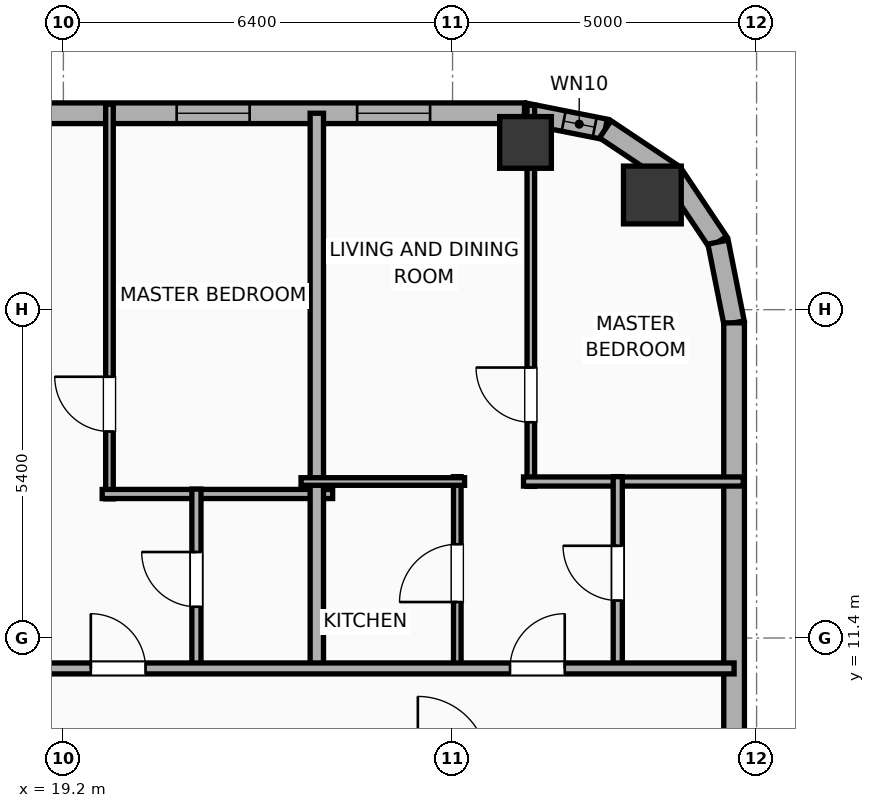
"""IFC4 building model, lengths in metres.
Left out: names, types, materials, properties, quantities, classifications, styles, units other than length and angle.
Written with IfcOpenShell. Run it as: python <this file> out.ifc"""

import sys

from ifc_helpers import new_model, si_unit, direction, frame, frame_2d, origin, origin_2d, place, context, subcontext, project, spatial, rectangle, hollow_rectangle, hollow_circle, extrude, element, fill, save


model = new_model("IFC4")
c1 = context("Model", 3, precision=1e-05, world=origin(), true_north=direction((0.0, 1.0)))
c2 = subcontext(c1, "Body", "Model", "MODEL_VIEW")
j1 = project(units=[si_unit("LENGTHUNIT", "METRE"), si_unit("PLANEANGLEUNIT", "RADIAN")], contexts=[c1])
p1 = place(None, origin())
s1 = spatial("IfcSite", under=j1, at=p1, CompositionType="ELEMENT")
p2 = place(p1, origin())
s2 = spatial("IfcBuilding", under=s1, at=p2, CompositionType="ELEMENT")
p3 = place(p2, frame((0.0, 0.0, 243.1)))
s3 = spatial("IfcBuildingStorey", under=s2, at=p3, CompositionType="ELEMENT", Elevation=243.1)
p4 = place(p3, frame((28.886, 18.686, 0.0), z_axis=(0.0, 0.0, 1.0), x_axis=(1.0, 0.0, 0.0)))
e1 = element("IfcColumn", 1, at=p4, inside=s3, PredefinedType="COLUMN", context=c2, shape_type="SweptSolid", body=[
    extrude(hollow_circle(Radius=0.475, WallThickness=0.032, at=origin_2d()), origin(), (0.0, 0.0, 1.0), 3.9),
])
p5 = place(p3, frame((26.8, 19.55, 0.0), z_axis=(0.0, 0.0, 1.0), x_axis=(1.0, 0.0, 0.0)))
e2 = element("IfcColumn", 2, at=p5, inside=s3, PredefinedType="COLUMN", context=c2, shape_type="SweptSolid", body=[
    extrude(hollow_rectangle(XDim=0.85, YDim=0.85, WallThickness=0.028, at=origin_2d()), origin(), (0.0, 0.0, 1.0), 3.9),
])
p6 = place(p3, frame((-22.783, 20.03, 0.0), z_axis=(0.0, 0.0, 1.0), x_axis=(1.0, 0.0, 0.0)))
e3 = element("IfcWall", 3, at=p6, inside=s3, PredefinedType="ELEMENTEDWALL", context=c2, shape_type="SweptSolid", body=[
    extrude(rectangle(XDim=49.566, YDim=0.34, at=frame_2d((24.783, 0.0))), origin(), (0.0, 0.0, 1.0), 3.65),
])
p7 = place(p6, frame((6.211, 0.0, 0.75)))
e4 = element("IfcOpeningElement", 4, at=p7, cuts=e3, PredefinedType="OPENING", context=c2, shape_type="SweptSolid", body=[
    extrude(rectangle(XDim=2.4, YDim=2.1, at=frame_2d((1.2, 1.05))), frame((0.0, 0.18, 0.0), z_axis=(0.0, -1.0, 0.0), x_axis=(1.0, 0.0, 0.0)), (0.0, 0.0, 1.0), 0.36),
])
p8 = place(p6, frame((25.233, 0.0, 0.75)))
e5 = element("IfcOpeningElement", 5, at=p8, cuts=e3, PredefinedType="OPENING", context=c2, shape_type="SweptSolid", body=[
    extrude(rectangle(XDim=2.4, YDim=2.1, at=frame_2d((1.2, 1.05))), frame((0.0, 0.18, 0.0), z_axis=(0.0, -1.0, 0.0), x_axis=(1.0, 0.0, 0.0)), (0.0, 0.0, 1.0), 0.36),
])
p9 = place(p6, frame((3.511, 0.0, 0.75)))
e6 = element("IfcOpeningElement", 6, at=p9, cuts=e3, PredefinedType="OPENING", context=c2, shape_type="SweptSolid", body=[
    extrude(rectangle(XDim=1.2, YDim=2.05, at=frame_2d((0.6, 1.025))), frame((0.0, 0.18, 0.0), z_axis=(0.0, -1.0, 0.0), x_axis=(1.0, 0.0, 0.0)), (0.0, 0.0, 1.0), 0.36),
])
p10 = place(p6, frame((10.728, 0.0, 0.75)))
e7 = element("IfcOpeningElement", 7, at=p10, cuts=e3, PredefinedType="OPENING", context=c2, shape_type="SweptSolid", body=[
    extrude(rectangle(XDim=1.2, YDim=2.05, at=frame_2d((0.6, 1.025))), frame((0.0, 0.18, 0.0), z_axis=(0.0, -1.0, 0.0), x_axis=(1.0, 0.0, 0.0)), (0.0, 0.0, 1.0), 0.36),
])
p11 = place(p6, frame((14.478, 0.0, 0.75)))
e8 = element("IfcOpeningElement", 8, at=p11, cuts=e3, PredefinedType="OPENING", context=c2, shape_type="SweptSolid", body=[
    extrude(rectangle(XDim=1.2, YDim=2.05, at=frame_2d((0.6, 1.025))), frame((0.0, 0.18, 0.0), z_axis=(0.0, -1.0, 0.0), x_axis=(1.0, 0.0, 0.0)), (0.0, 0.0, 1.0), 0.36),
])
p12 = place(p6, frame((17.988, 0.0, 0.75)))
e9 = element("IfcOpeningElement", 9, at=p12, cuts=e3, PredefinedType="OPENING", context=c2, shape_type="SweptSolid", body=[
    extrude(rectangle(XDim=1.2, YDim=2.05, at=frame_2d((0.6, 1.025))), frame((0.0, 0.18, 0.0), z_axis=(0.0, -1.0, 0.0), x_axis=(1.0, 0.0, 0.0)), (0.0, 0.0, 1.0), 0.36),
])
p13 = place(p6, frame((21.978, 0.0, 0.75)))
e10 = element("IfcOpeningElement", 10, at=p13, cuts=e3, PredefinedType="OPENING", context=c2, shape_type="SweptSolid", body=[
    extrude(rectangle(XDim=1.2, YDim=2.05, at=frame_2d((0.6, 1.025))), frame((0.0, 0.18, 0.0), z_axis=(0.0, -1.0, 0.0), x_axis=(1.0, 0.0, 0.0)), (0.0, 0.0, 1.0), 0.36),
])
p14 = place(p6, frame((30.373, 0.0, 0.75)))
e11 = element("IfcOpeningElement", 11, at=p14, cuts=e3, PredefinedType="OPENING", context=c2, shape_type="SweptSolid", body=[
    extrude(rectangle(XDim=0.85, YDim=2.05, at=frame_2d((0.425, 1.025))), frame((0.0, 0.18, 0.0), z_axis=(0.0, -1.0, 0.0), x_axis=(1.0, 0.0, 0.0)), (0.0, 0.0, 1.0), 0.36),
])
p15 = place(p6, frame((33.228, 0.0, 0.75)))
e12 = element("IfcOpeningElement", 12, at=p15, cuts=e3, PredefinedType="OPENING", context=c2, shape_type="SweptSolid", body=[
    extrude(rectangle(XDim=1.2, YDim=2.05, at=frame_2d((0.6, 1.025))), frame((0.0, 0.18, 0.0), z_axis=(0.0, -1.0, 0.0), x_axis=(1.0, 0.0, 0.0)), (0.0, 0.0, 1.0), 0.36),
])
p16 = place(p6, frame((36.978, 0.0, 0.75)))
e13 = element("IfcOpeningElement", 13, at=p16, cuts=e3, PredefinedType="OPENING", context=c2, shape_type="SweptSolid", body=[
    extrude(rectangle(XDim=1.2, YDim=2.05, at=frame_2d((0.6, 1.025))), frame((0.0, 0.18, 0.0), z_axis=(0.0, -1.0, 0.0), x_axis=(1.0, 0.0, 0.0)), (0.0, 0.0, 1.0), 0.36),
])
p17 = place(p6, frame((40.412, 0.0, 0.75)))
e14 = element("IfcOpeningElement", 14, at=p17, cuts=e3, PredefinedType="OPENING", context=c2, shape_type="SweptSolid", body=[
    extrude(rectangle(XDim=1.2, YDim=2.05, at=frame_2d((0.6, 1.025))), frame((0.0, 0.18, 0.0), z_axis=(0.0, -1.0, 0.0), x_axis=(1.0, 0.0, 0.0)), (0.0, 0.0, 1.0), 0.36),
])
p18 = place(p6, frame((43.846, 0.0, 0.75)))
e15 = element("IfcOpeningElement", 15, at=p18, cuts=e3, PredefinedType="OPENING", context=c2, shape_type="SweptSolid", body=[
    extrude(rectangle(XDim=1.2, YDim=2.05, at=frame_2d((0.6, 1.025))), frame((0.0, 0.18, 0.0), z_axis=(0.0, -1.0, 0.0), x_axis=(1.0, 0.0, 0.0)), (0.0, 0.0, 1.0), 0.36),
])
p19 = place(p6, frame((46.814, 0.0, 0.75)))
e16 = element("IfcOpeningElement", 16, at=p19, cuts=e3, PredefinedType="OPENING", context=c2, shape_type="SweptSolid", body=[
    extrude(rectangle(XDim=1.2, YDim=2.05, at=frame_2d((0.6, 1.025))), frame((0.0, 0.18, 0.0), z_axis=(0.0, -1.0, 0.0), x_axis=(1.0, 0.0, 0.0)), (0.0, 0.0, 1.0), 0.36),
])
p20 = place(p3, frame((26.783, 20.03, 0.0), z_axis=(0.0, 0.0, 1.0), x_axis=(0.980788153188, -0.195075878998, 0.0)))
e17 = element("IfcWall", 17, at=p20, inside=s3, PredefinedType="ELEMENTEDWALL", context=c2, shape_type="SweptSolid", body=[
    extrude(rectangle(XDim=1.354, YDim=0.34, at=frame_2d((0.677, 0.0))), origin(), (0.0, 0.0, 1.0), 3.65),
])
p21 = place(p20, frame((0.657, 0.0, 0.75)))
e18 = element("IfcOpeningElement", 18, at=p21, cuts=e17, PredefinedType="OPENING", context=c2, shape_type="SweptSolid", body=[
    extrude(rectangle(XDim=0.52, YDim=2.05, at=frame_2d((0.26, 1.025))), frame((0.0, 0.18, 0.0), z_axis=(0.0, -1.0, 0.0), x_axis=(1.0, 0.0, 0.0)), (0.0, 0.0, 1.0), 0.36),
])
for number, where, z_axis, x_axis in (
    (19, (28.111, 19.766, 0.0), (0.0, 0.0, 1.0), (0.831, -0.556, 0.0)),
    (20, (29.223, 19.023, 0.0), (0.0, 0.0, 1.0), (0.556, -0.831, 0.0)),
):
    element("IfcWall", number, at=place(p3, frame(where, z_axis=z_axis, x_axis=x_axis)), inside=s3, PredefinedType="ELEMENTEDWALL", context=c2, shape_type="SweptSolid", body=[
        extrude(rectangle(XDim=1.337, YDim=0.34, at=frame_2d((0.668, 0.0))), origin(), (0.0, 0.0, 1.0), 3.65),
    ])
p22 = place(p3, frame((29.966, 17.911, 0.0), z_axis=(0.0, 0.0, 1.0), x_axis=(0.195075878998, -0.980788153188, 0.0)))
e21 = element("IfcWall", 21, at=p22, inside=s3, PredefinedType="ELEMENTEDWALL", context=c2, shape_type="SweptSolid", body=[
    extrude(rectangle(XDim=1.354, YDim=0.34, at=frame_2d((0.677, 0.0))), origin(), (0.0, 0.0, 1.0), 3.65),
])
p23 = place(p3, frame((30.23, 16.583, 0.0), z_axis=(0.0, 0.0, 1.0), x_axis=(0.0, -1.0, 0.0)))
e22 = element("IfcWall", 22, at=p23, inside=s3, PredefinedType="ELEMENTEDWALL", context=c2, shape_type="SweptSolid", body=[
    extrude(rectangle(XDim=31.967, YDim=0.34, at=frame_2d((15.983, 0.0))), origin(), (0.0, 0.0, 1.0), 3.65),
])
p24 = place(p23, frame((30.196, 0.0, 0.75)))
e23 = element("IfcOpeningElement", 23, at=p24, cuts=e22, PredefinedType="OPENING", context=c2, shape_type="SweptSolid", body=[
    extrude(rectangle(XDim=1.2, YDim=2.05, at=frame_2d((0.6, 1.025))), frame((0.0, 0.18, 0.0), z_axis=(0.0, -1.0, 0.0), x_axis=(1.0, 0.0, 0.0)), (0.0, 0.0, 1.0), 0.36),
])
p25 = place(p23, frame((11.238, 0.0, 0.75)))
e24 = element("IfcOpeningElement", 24, at=p25, cuts=e22, PredefinedType="OPENING", context=c2, shape_type="SweptSolid", body=[
    extrude(rectangle(XDim=1.2, YDim=2.05, at=frame_2d((0.6, 1.025))), frame((0.0, 0.18, 0.0), z_axis=(0.0, -1.0, 0.0), x_axis=(1.0, 0.0, 0.0)), (0.0, 0.0, 1.0), 0.36),
])
p26 = place(p23, frame((20.588, 0.0, 0.75)))
e25 = element("IfcOpeningElement", 25, at=p26, cuts=e22, PredefinedType="OPENING", context=c2, shape_type="SweptSolid", body=[
    extrude(rectangle(XDim=1.2, YDim=2.05, at=frame_2d((0.6, 1.025))), frame((0.0, 0.18, 0.0), z_axis=(0.0, -1.0, 0.0), x_axis=(1.0, 0.0, 0.0)), (0.0, 0.0, 1.0), 0.36),
])
p27 = place(p3, frame((19.958, 13.689, 0.0), z_axis=(0.0, 0.0, 1.0), x_axis=(0.0, 1.0, 0.0)))
e26 = element("IfcWall", 26, at=p27, inside=s3, PredefinedType="PARTITIONING", context=c2, shape_type="SweptSolid", body=[
    extrude(rectangle(XDim=6.491, YDim=0.125, at=frame_2d((3.246, 0.0))), origin(), (0.0, 0.0, 1.0), 3.65),
])
p28 = place(p27, frame((1.108, 0.0, 0.0)))
e27 = element("IfcOpeningElement", 27, at=p28, cuts=e26, PredefinedType="OPENING", context=c2, shape_type="SweptSolid", body=[
    extrude(rectangle(XDim=0.9, YDim=2.05, at=frame_2d((0.45, 1.025))), frame((0.0, 0.073, 0.0), z_axis=(0.0, -1.0, 0.0), x_axis=(1.0, 0.0, 0.0)), (0.0, 0.0, 1.0), 0.145),
])
p29 = place(p3, frame((19.838, 13.769, 0.0), z_axis=(0.0, 0.0, 1.0), x_axis=(1.0, 0.0, 0.0)))
e28 = element("IfcWall", 28, at=p29, inside=s3, PredefinedType="PLUMBINGWALL", context=c2, shape_type="SweptSolid", body=[
    extrude(rectangle(XDim=3.79, YDim=0.15, at=frame_2d((1.895, 0.0))), origin(), (0.0, 0.0, 1.0), 3.65),
])
p30 = place(p3, frame((21.388, 10.88, 0.0), z_axis=(0.0, 0.0, 1.0), x_axis=(0.0, 1.0, 0.0)))
e29 = element("IfcWall", 29, at=p30, inside=s3, PredefinedType="PLUMBINGWALL", context=c2, shape_type="SweptSolid", body=[
    extrude(rectangle(XDim=2.969, YDim=0.15, at=frame_2d((1.485, 0.0))), origin(), (0.0, 0.0, 1.0), 3.65),
])
p31 = place(p30, frame((1.034, 0.0, 0.0)))
e30 = element("IfcOpeningElement", 30, at=p31, cuts=e29, PredefinedType="OPENING", context=c2, shape_type="SweptSolid", body=[
    extrude(rectangle(XDim=0.9, YDim=2.05, at=frame_2d((0.45, 1.025))), frame((0.0, 0.085, 0.0), z_axis=(0.0, -1.0, 0.0), x_axis=(1.0, 0.0, 0.0)), (0.0, 0.0, 1.0), 0.17),
])
p32 = place(p3, frame((23.368, 10.82, 0.0), z_axis=(0.0, 0.0, 1.0), x_axis=(0.0, 1.0, 0.0)))
e31 = element("IfcWall", 31, at=p32, inside=s3, PredefinedType="PARTITIONING", context=c2, shape_type="SweptSolid", body=[
    extrude(rectangle(XDim=9.21, YDim=0.22, at=frame_2d((4.605, 0.0))), origin(), (0.0, 0.0, 1.0), 3.65),
])
p33 = place(p3, frame((26.887, 13.894, 0.0), z_axis=(0.0, 0.0, 1.0), x_axis=(0.0, 1.0, 0.0)))
e32 = element("IfcWall", 32, at=p33, inside=s3, PredefinedType="PARTITIONING", context=c2, shape_type="SweptSolid", body=[
    extrude(rectangle(XDim=6.268, YDim=0.125, at=frame_2d((3.134, 0.0))), origin(), (0.0, 0.0, 1.0), 3.65),
])
p34 = place(p33, frame((1.054, 0.0, 0.0)))
e33 = element("IfcOpeningElement", 33, at=p34, cuts=e32, PredefinedType="OPENING", context=c2, shape_type="SweptSolid", body=[
    extrude(rectangle(XDim=0.9, YDim=2.05, at=frame_2d((0.45, 1.025))), frame((0.0, 0.073, 0.0), z_axis=(0.0, -1.0, 0.0), x_axis=(1.0, 0.0, 0.0)), (0.0, 0.0, 1.0), 0.145),
])
p35 = place(p3, frame((26.767, 13.974, 0.0), z_axis=(0.0, 0.0, 1.0), x_axis=(1.0, 0.0, 0.0)))
e34 = element("IfcWall", 34, at=p35, inside=s3, PredefinedType="PLUMBINGWALL", context=c2, shape_type="SweptSolid", body=[
    extrude(rectangle(XDim=3.613, YDim=0.15, at=frame_2d((1.806, 0.0))), origin(), (0.0, 0.0, 1.0), 3.65),
])
p36 = place(p3, frame((25.678, 10.88, 0.0), z_axis=(0.0, 0.0, 1.0), x_axis=(0.0, 1.0, 0.0)))
e35 = element("IfcWall", 35, at=p36, inside=s3, PredefinedType="PARTITIONING", context=c2, shape_type="SweptSolid", body=[
    extrude(rectangle(XDim=3.174, YDim=0.125, at=frame_2d((1.587, 0.0))), origin(), (0.0, 0.0, 1.0), 3.65),
])
p37 = place(p36, frame((1.112, 0.0, 0.0)))
e36 = element("IfcOpeningElement", 36, at=p37, cuts=e35, PredefinedType="OPENING", context=c2, shape_type="SweptSolid", body=[
    extrude(rectangle(XDim=0.95, YDim=2.05, at=frame_2d((0.475, 1.025))), frame((0.0, 0.073, 0.0), z_axis=(0.0, -1.0, 0.0), x_axis=(1.0, 0.0, 0.0)), (0.0, 0.0, 1.0), 0.145),
])
p38 = place(p3, frame((23.108, 13.974, 0.0), z_axis=(0.0, 0.0, 1.0), x_axis=(1.0, 0.0, 0.0)))
e37 = element("IfcWall", 37, at=p38, inside=s3, PredefinedType="PARTITIONING", context=c2, shape_type="SweptSolid", body=[
    extrude(rectangle(XDim=2.69, YDim=0.125, at=frame_2d((1.345, 0.0))), origin(), (0.0, 0.0, 1.0), 3.65),
])
p39 = place(p3, frame((28.317, 10.88, 0.0), z_axis=(0.0, 0.0, 1.0), x_axis=(0.0, 1.0, 0.0)))
e38 = element("IfcWall", 38, at=p39, inside=s3, PredefinedType="PLUMBINGWALL", context=c2, shape_type="SweptSolid", body=[
    extrude(rectangle(XDim=3.174, YDim=0.15, at=frame_2d((1.587, 0.0))), origin(), (0.0, 0.0, 1.0), 3.65),
])
p40 = place(p39, frame((1.137, 0.0, 0.0)))
e39 = element("IfcOpeningElement", 39, at=p40, cuts=e38, PredefinedType="OPENING", context=c2, shape_type="SweptSolid", body=[
    extrude(rectangle(XDim=0.9, YDim=2.05, at=frame_2d((0.45, 1.025))), frame((0.0, 0.085, 0.0), z_axis=(0.0, -1.0, 0.0), x_axis=(1.0, 0.0, 0.0)), (0.0, 0.0, 1.0), 0.17),
])
p41 = place(p3, frame((-26.23, 10.9, 0.0), z_axis=(0.0, 0.0, 1.0), x_axis=(1.0, 0.0, 0.0)))
e40 = element("IfcWall", 40, at=p41, inside=s3, PredefinedType="PARTITIONING", context=c2, shape_type="SweptSolid", body=[
    extrude(rectangle(XDim=56.46, YDim=0.18, at=frame_2d((28.23, 0.0))), origin(), (0.0, 0.0, 1.0), 3.65),
])
p42 = place(p41, frame((2.825, 0.0, 0.0)))
e41 = element("IfcOpeningElement", 41, at=p42, cuts=e40, PredefinedType="OPENING", context=c2, shape_type="SweptSolid", body=[
    extrude(rectangle(XDim=0.9, YDim=2.05, at=frame_2d((0.45, 1.025))), frame((0.0, 0.1, 0.0), z_axis=(0.0, -1.0, 0.0), x_axis=(1.0, 0.0, 0.0)), (0.0, 0.0, 1.0), 0.2),
])
p43 = place(p41, frame((10.135, 0.0, 0.0)))
e42 = element("IfcOpeningElement", 42, at=p43, cuts=e40, PredefinedType="OPENING", context=c2, shape_type="SweptSolid", body=[
    extrude(rectangle(XDim=1.15, YDim=2.05, at=frame_2d((0.575, 1.025))), frame((0.0, 0.1, 0.0), z_axis=(0.0, -1.0, 0.0), x_axis=(1.0, 0.0, 0.0)), (0.0, 0.0, 1.0), 0.2),
])
p44 = place(p41, frame((16.069, 0.0, 0.0)))
e43 = element("IfcOpeningElement", 43, at=p44, cuts=e40, PredefinedType="OPENING", context=c2, shape_type="SweptSolid", body=[
    extrude(rectangle(XDim=1.15, YDim=2.05, at=frame_2d((0.575, 1.025))), frame((0.0, 0.1, 0.0), z_axis=(0.0, -1.0, 0.0), x_axis=(1.0, 0.0, 0.0)), (0.0, 0.0, 1.0), 0.2),
])
p45 = place(p41, frame((23.567, 0.0, 0.0)))
e44 = element("IfcOpeningElement", 44, at=p45, cuts=e40, PredefinedType="OPENING", context=c2, shape_type="SweptSolid", body=[
    extrude(rectangle(XDim=1.15, YDim=2.05, at=frame_2d((0.575, 1.025))), frame((0.0, 0.1, 0.0), z_axis=(0.0, -1.0, 0.0), x_axis=(1.0, 0.0, 0.0)), (0.0, 0.0, 1.0), 0.2),
])
p46 = place(p41, frame((31.071, 0.0, 0.0)))
e45 = element("IfcOpeningElement", 45, at=p46, cuts=e40, PredefinedType="OPENING", context=c2, shape_type="SweptSolid", body=[
    extrude(rectangle(XDim=1.15, YDim=2.05, at=frame_2d((0.575, 1.025))), frame((0.0, 0.1, 0.0), z_axis=(0.0, -1.0, 0.0), x_axis=(1.0, 0.0, 0.0)), (0.0, 0.0, 1.0), 0.2),
])
p47 = place(p41, frame((38.569, 0.0, 0.0)))
e46 = element("IfcOpeningElement", 46, at=p47, cuts=e40, PredefinedType="OPENING", context=c2, shape_type="SweptSolid", body=[
    extrude(rectangle(XDim=1.15, YDim=2.05, at=frame_2d((0.575, 1.025))), frame((0.0, 0.1, 0.0), z_axis=(0.0, -1.0, 0.0), x_axis=(1.0, 0.0, 0.0)), (0.0, 0.0, 1.0), 0.2),
])
p48 = place(p41, frame((45.881, 0.0, 0.0)))
e47 = element("IfcOpeningElement", 47, at=p48, cuts=e40, PredefinedType="OPENING", context=c2, shape_type="SweptSolid", body=[
    extrude(rectangle(XDim=0.9, YDim=2.05, at=frame_2d((0.45, 1.025))), frame((0.0, 0.1, 0.0), z_axis=(0.0, -1.0, 0.0), x_axis=(1.0, 0.0, 0.0)), (0.0, 0.0, 1.0), 0.2),
])
p49 = place(p41, frame((52.775, 0.0, 0.0)))
e48 = element("IfcOpeningElement", 48, at=p49, cuts=e40, PredefinedType="OPENING", context=c2, shape_type="SweptSolid", body=[
    extrude(rectangle(XDim=0.9, YDim=2.05, at=frame_2d((0.45, 1.025))), frame((0.0, 0.1, 0.0), z_axis=(0.0, -1.0, 0.0), x_axis=(1.0, 0.0, 0.0)), (0.0, 0.0, 1.0), 0.2),
])
p50 = place(p18, origin())
e49 = element("IfcWindow", 49, at=p50, inside=s3, PartitioningType="SINGLE_PANEL", PredefinedType="WINDOW", context=c2, shape_type="SweptSolid", body=[
    extrude(rectangle(XDim=1.2, YDim=2.05, at=frame_2d((0.6, 1.025))), frame((0.0, 0.03, 0.0), z_axis=(0.0, -1.0, 0.0), x_axis=(1.0, 0.0, 0.0)), (0.0, 0.0, 1.0), 0.06),
])
fill(e15, e49)
p51 = place(p19, origin())
e50 = element("IfcWindow", 50, at=p51, inside=s3, PartitioningType="SINGLE_PANEL", PredefinedType="WINDOW", context=c2, shape_type="SweptSolid", body=[
    extrude(rectangle(XDim=1.2, YDim=2.05, at=frame_2d((0.6, 1.025))), frame((0.0, 0.03, 0.0), z_axis=(0.0, -1.0, 0.0), x_axis=(1.0, 0.0, 0.0)), (0.0, 0.0, 1.0), 0.06),
])
fill(e16, e50)
p52 = place(p21, origin())
e51 = element("IfcWindow", 51, at=p52, inside=s3, PartitioningType="SINGLE_PANEL", PredefinedType="WINDOW", context=c2, shape_type="SweptSolid", body=[
    extrude(rectangle(XDim=0.52, YDim=2.05, at=frame_2d((0.26, 1.025))), frame((0.0, 0.03, 0.0), z_axis=(0.0, -1.0, 0.0), x_axis=(1.0, 0.0, 0.0)), (0.0, 0.0, 1.0), 0.06),
])
fill(e18, e51)
p53 = place(p28, origin())
e52 = element("IfcDoor", 52, at=p53, inside=s3, OperationType="SINGLE_SWING_RIGHT", PredefinedType="DOOR", context=c2, shape_type="SweptSolid", body=[
    extrude(rectangle(XDim=0.9, YDim=2.05, at=frame_2d((0.45, 1.025))), frame((0.0, 0.025, 0.0), z_axis=(0.0, -1.0, 0.0), x_axis=(1.0, 0.0, 0.0)), (0.0, 0.0, 1.0), 0.05),
])
fill(e27, e52)
p54 = place(p31, origin())
e53 = element("IfcDoor", 53, at=p54, inside=s3, OperationType="SINGLE_SWING_RIGHT", PredefinedType="DOOR", context=c2, shape_type="SweptSolid", body=[
    extrude(rectangle(XDim=0.9, YDim=2.05, at=frame_2d((0.45, 1.025))), frame((0.0, 0.025, 0.0), z_axis=(0.0, -1.0, 0.0), x_axis=(1.0, 0.0, 0.0)), (0.0, 0.0, 1.0), 0.05),
])
fill(e30, e53)
p55 = place(p34, origin())
e54 = element("IfcDoor", 54, at=p55, inside=s3, OperationType="SINGLE_SWING_RIGHT", PredefinedType="DOOR", context=c2, shape_type="SweptSolid", body=[
    extrude(rectangle(XDim=0.9, YDim=2.05, at=frame_2d((0.45, 1.025))), frame((0.0, 0.025, 0.0), z_axis=(0.0, -1.0, 0.0), x_axis=(1.0, 0.0, 0.0)), (0.0, 0.0, 1.0), 0.05),
])
fill(e33, e54)
p56 = place(p37, origin())
e55 = element("IfcDoor", 55, at=p56, inside=s3, OperationType="SINGLE_SWING_LEFT", PredefinedType="DOOR", context=c2, shape_type="SweptSolid", body=[
    extrude(rectangle(XDim=0.95, YDim=2.05, at=frame_2d((0.475, 1.025))), frame((0.0, 0.025, 0.0), z_axis=(0.0, -1.0, 0.0), x_axis=(1.0, 0.0, 0.0)), (0.0, 0.0, 1.0), 0.05),
])
fill(e36, e55)
p57 = place(p40, origin())
e56 = element("IfcDoor", 56, at=p57, inside=s3, OperationType="SINGLE_SWING_RIGHT", PredefinedType="DOOR", context=c2, shape_type="SweptSolid", body=[
    extrude(rectangle(XDim=0.9, YDim=2.05, at=frame_2d((0.45, 1.025))), frame((0.0, 0.025, 0.0), z_axis=(0.0, -1.0, 0.0), x_axis=(1.0, 0.0, 0.0)), (0.0, 0.0, 1.0), 0.05),
])
fill(e39, e56)
p58 = place(p48, origin())
e57 = element("IfcDoor", 57, at=p58, inside=s3, OperationType="SINGLE_SWING_LEFT", PredefinedType="DOOR", context=c2, shape_type="SweptSolid", body=[
    extrude(rectangle(XDim=0.9, YDim=2.05, at=frame_2d((0.45, 1.025))), frame((0.0, 0.025, 0.0), z_axis=(0.0, -1.0, 0.0), x_axis=(1.0, 0.0, 0.0)), (0.0, 0.0, 1.0), 0.05),
])
fill(e47, e57)
p59 = place(p49, origin())
e58 = element("IfcDoor", 58, at=p59, inside=s3, OperationType="SINGLE_SWING_RIGHT", PredefinedType="DOOR", context=c2, shape_type="SweptSolid", body=[
    extrude(rectangle(XDim=0.9, YDim=2.05, at=frame_2d((0.45, 1.025))), frame((0.0, 0.025, 0.0), z_axis=(0.0, -1.0, 0.0), x_axis=(1.0, 0.0, 0.0)), (0.0, 0.0, 1.0), 0.05),
])
fill(e48, e58)
save(model, sys.argv[1])
